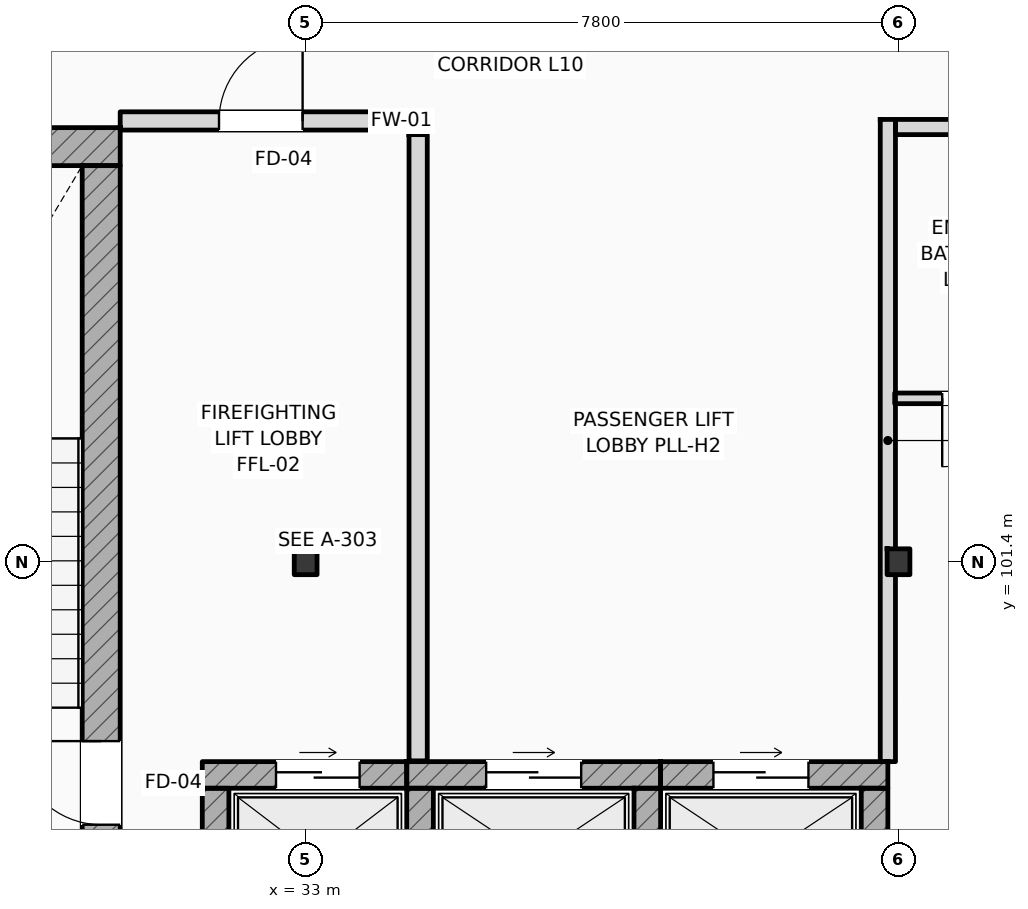
"""IFC4 building model, lengths in metres.
Left out: names, types, materials, properties, quantities, classifications, styles, units other than length and angle.
Written with IfcOpenShell. Run it as: python <this file> out.ifc"""

import sys

from ifc_helpers import new_model, si_unit, direction, frame, frame_2d, origin, origin_2d, place, context, subcontext, project, spatial, rectangle, i_section, extrude, element, fill, save


model = new_model("IFC4")
c1 = context("Model", 3, precision=1e-05, world=origin(), true_north=direction((0.0, 1.0)))
c2 = subcontext(c1, "Body", "Model", "MODEL_VIEW")
j1 = project(units=[si_unit("LENGTHUNIT", "METRE"), si_unit("PLANEANGLEUNIT", "RADIAN")], contexts=[c1])
p1 = place(None, origin())
s1 = spatial("IfcSite", under=j1, at=p1, CompositionType="ELEMENT")
p2 = place(p1, origin())
s2 = spatial("IfcBuilding", under=s1, at=p2, CompositionType="ELEMENT")
p3 = place(p2, frame((0.0, 0.0, 42.6)))
s3 = spatial("IfcBuildingStorey", under=s2, at=p3, CompositionType="ELEMENT", Elevation=42.6)
for number, where, z_axis, x_axis in (
    (1, (33.0, 101.4, 0.0), (0.0, 0.0, 1.0), (1.0, 0.0, 0.0)),
    (2, (40.8, 101.4, 0.0), (0.0, 0.0, 1.0), (1.0, 0.0, 0.0)),
):
    element("IfcColumn", number, at=place(p3, frame(where, z_axis=z_axis, x_axis=x_axis)), inside=s3, PredefinedType="COLUMN", context=c2, shape_type="SweptSolid", body=[
        extrude(i_section(OverallWidth=0.3, OverallDepth=0.34, WebThickness=0.012, FlangeThickness=0.021, FilletRadius=0.027, at=origin_2d()), origin(), (0.0, 0.0, 1.0), 4.2),
    ])
p4 = place(p3, frame((25.4, 106.862, 0.0), z_axis=(0.0, 0.0, 1.0), x_axis=(1.0, 0.0, 0.0)))
e3 = element("IfcWall", 3, at=p4, inside=s3, PredefinedType="SHEAR", context=c2, shape_type="SweptSolid", body=[
    extrude(rectangle(XDim=5.16, YDim=0.5, at=frame_2d((2.58, 0.0))), origin(), (0.0, 0.0, 1.0), 4.2),
])
p5 = place(p3, frame((30.31, 97.5, 0.0), z_axis=(0.0, 0.0, 1.0), x_axis=(0.0, 1.0, 0.0)))
e4 = element("IfcWall", 4, at=p5, inside=s3, PredefinedType="SHEAR", context=c2, shape_type="SweptSolid", body=[
    extrude(rectangle(XDim=9.112, YDim=0.5, at=frame_2d((4.556, 0.0))), origin(), (0.0, 0.0, 1.0), 4.2),
])
p6 = place(p5, frame((0.44, 0.0, 0.0)))
e5 = element("IfcOpeningElement", 5, at=p6, cuts=e4, PredefinedType="OPENING", context=c2, shape_type="SweptSolid", body=[
    extrude(rectangle(XDim=1.1, YDim=2.2, at=frame_2d((0.55, 1.1))), frame((0.0, 0.26, 0.0), z_axis=(0.0, -1.0, 0.0), x_axis=(1.0, 0.0, 0.0)), (0.0, 0.0, 1.0), 0.52),
])
p7 = place(p3, frame((31.64, 98.595, 0.0), z_axis=(0.0, 0.0, 1.0), x_axis=(1.0, 0.0, 0.0)))
e6 = element("IfcWall", 6, at=p7, inside=s3, PredefinedType="SHEAR", context=c2, shape_type="SweptSolid", body=[
    extrude(rectangle(XDim=2.69, YDim=0.35, at=frame_2d((1.345, 0.0))), origin(), (0.0, 0.0, 1.0), 3.94),
])
p8 = place(p7, frame((0.97, 0.0, 0.0)))
e7 = element("IfcOpeningElement", 7, at=p8, cuts=e6, PredefinedType="OPENING", context=c2, shape_type="SweptSolid", body=[
    extrude(rectangle(XDim=1.1, YDim=2.2, at=frame_2d((0.55, 1.1))), frame((0.0, 0.185, 0.0), z_axis=(0.0, -1.0, 0.0), x_axis=(1.0, 0.0, 0.0)), (0.0, 0.0, 1.0), 0.37),
])
p9 = place(p3, frame((31.815, 96.58, 0.0), z_axis=(0.0, 0.0, 1.0), x_axis=(0.0, 1.0, 0.0)))
e8 = element("IfcWall", 8, at=p9, inside=s3, PredefinedType="SHEAR", context=c2, shape_type="SweptSolid", body=[
    extrude(rectangle(XDim=1.84, YDim=0.35, at=frame_2d((0.92, 0.0))), origin(), (0.0, 0.0, 1.0), 3.94),
])
p10 = place(p3, frame((34.33, 98.595, 0.0), z_axis=(0.0, 0.0, 1.0), x_axis=(1.0, 0.0, 0.0)))
e9 = element("IfcWall", 9, at=p10, inside=s3, PredefinedType="SHEAR", context=c2, shape_type="SweptSolid", body=[
    extrude(rectangle(XDim=3.34, YDim=0.35, at=frame_2d((1.67, 0.0))), origin(), (0.0, 0.0, 1.0), 3.94),
])
p11 = place(p10, frame((1.045, 0.0, 0.0)))
e10 = element("IfcOpeningElement", 10, at=p11, cuts=e9, PredefinedType="OPENING", context=c2, shape_type="SweptSolid", body=[
    extrude(rectangle(XDim=1.25, YDim=2.25, at=frame_2d((0.625, 1.125))), frame((0.0, 0.185, 0.0), z_axis=(0.0, -1.0, 0.0), x_axis=(1.0, 0.0, 0.0)), (0.0, 0.0, 1.0), 0.37),
])
for number, where, z_axis, x_axis in (
    (11, (34.505, 96.58, 0.0), (0.0, 0.0, 1.0), (0.0, 1.0, 0.0)),
    (12, (37.495, 96.58, 0.0), (0.0, 0.0, 1.0), (0.0, 1.0, 0.0)),
):
    element("IfcWall", number, at=place(p3, frame(where, z_axis=z_axis, x_axis=x_axis)), inside=s3, PredefinedType="SHEAR", context=c2, shape_type="SweptSolid", body=[
        extrude(rectangle(XDim=1.84, YDim=0.35, at=frame_2d((0.92, 0.0))), origin(), (0.0, 0.0, 1.0), 3.94),
    ])
p12 = place(p3, frame((37.67, 98.595, 0.0), z_axis=(0.0, 0.0, 1.0), x_axis=(1.0, 0.0, 0.0)))
e13 = element("IfcWall", 13, at=p12, inside=s3, PredefinedType="SHEAR", context=c2, shape_type="SweptSolid", body=[
    extrude(rectangle(XDim=2.99, YDim=0.35, at=frame_2d((1.495, 0.0))), origin(), (0.0, 0.0, 1.0), 3.94),
])
p13 = place(p12, frame((0.695, 0.0, 0.0)))
e14 = element("IfcOpeningElement", 14, at=p13, cuts=e13, PredefinedType="OPENING", context=c2, shape_type="SweptSolid", body=[
    extrude(rectangle(XDim=1.25, YDim=2.25, at=frame_2d((0.625, 1.125))), frame((0.0, 0.185, 0.0), z_axis=(0.0, -1.0, 0.0), x_axis=(1.0, 0.0, 0.0)), (0.0, 0.0, 1.0), 0.37),
])
p14 = place(p3, frame((40.485, 96.58, 0.0), z_axis=(0.0, 0.0, 1.0), x_axis=(0.0, 1.0, 0.0)))
e15 = element("IfcWall", 15, at=p14, inside=s3, PredefinedType="SHEAR", context=c2, shape_type="SweptSolid", body=[
    extrude(rectangle(XDim=1.84, YDim=0.35, at=frame_2d((0.92, 0.0))), origin(), (0.0, 0.0, 1.0), 3.57),
])
p15 = place(p3, frame((34.48, 98.78, 0.0), z_axis=(0.0, 0.0, 1.0), x_axis=(0.0, 1.0, 0.0)))
e16 = element("IfcWall", 16, at=p15, inside=s3, PredefinedType="STANDARD", context=c2, shape_type="SweptSolid", body=[
    extrude(rectangle(XDim=8.24, YDim=0.24, at=frame_2d((4.12, 0.0))), origin(), (0.0, 0.0, 1.0), 3.94),
])
p16 = place(p3, frame((30.56, 107.2, 0.0), z_axis=(0.0, 0.0, 1.0), x_axis=(1.0, 0.0, 0.0)))
e17 = element("IfcWall", 17, at=p16, inside=s3, PredefinedType="STANDARD", context=c2, shape_type="SweptSolid", body=[
    extrude(rectangle(XDim=4.1, YDim=0.24, at=frame_2d((2.05, 0.0))), origin(), (0.0, 0.0, 1.0), 3.94),
])
p17 = place(p16, frame((1.3, 0.0, 0.0)))
e18 = element("IfcOpeningElement", 18, at=p17, cuts=e17, PredefinedType="OPENING", context=c2, shape_type="SweptSolid", body=[
    extrude(rectangle(XDim=1.1, YDim=2.2, at=frame_2d((0.55, 1.1))), frame((0.0, 0.13, 0.0), z_axis=(0.0, -1.0, 0.0), x_axis=(1.0, 0.0, 0.0)), (0.0, 0.0, 1.0), 0.26),
])
p18 = place(p3, frame((40.76, 107.12, 0.0), z_axis=(0.0, 0.0, 1.0), x_axis=(1.0, 0.0, 0.0)))
e19 = element("IfcWall", 19, at=p18, inside=s3, PredefinedType="PARTITIONING", context=c2, shape_type="SweptSolid", body=[
    extrude(rectangle(XDim=23.44, YDim=0.2, at=frame_2d((11.72, 0.0))), origin(), (0.0, 0.0, 1.0), 3.94),
])
p19 = place(p18, frame((2.99, 0.0, 0.0)))
e20 = element("IfcOpeningElement", 20, at=p19, cuts=e19, PredefinedType="OPENING", context=c2, shape_type="SweptSolid", body=[
    extrude(rectangle(XDim=0.96, YDim=2.2, at=frame_2d((0.48, 1.1))), frame((0.0, 0.11, 0.0), z_axis=(0.0, -1.0, 0.0), x_axis=(1.0, 0.0, 0.0)), (0.0, 0.0, 1.0), 0.22),
])
p20 = place(p18, frame((5.5, 0.0, 0.0)))
e21 = element("IfcOpeningElement", 21, at=p20, cuts=e19, PredefinedType="OPENING", context=c2, shape_type="SweptSolid", body=[
    extrude(rectangle(XDim=0.96, YDim=2.2, at=frame_2d((0.48, 1.1))), frame((0.0, 0.11, 0.0), z_axis=(0.0, -1.0, 0.0), x_axis=(1.0, 0.0, 0.0)), (0.0, 0.0, 1.0), 0.22),
])
p21 = place(p18, frame((12.34, 0.0, 0.0)))
e22 = element("IfcOpeningElement", 22, at=p21, cuts=e19, PredefinedType="OPENING", context=c2, shape_type="SweptSolid", body=[
    extrude(rectangle(XDim=0.96, YDim=2.2, at=frame_2d((0.48, 1.1))), frame((0.0, 0.11, 0.0), z_axis=(0.0, -1.0, 0.0), x_axis=(1.0, 0.0, 0.0)), (0.0, 0.0, 1.0), 0.22),
])
p22 = place(p18, frame((17.03, 0.0, 0.0)))
e23 = element("IfcOpeningElement", 23, at=p22, cuts=e19, PredefinedType="OPENING", context=c2, shape_type="SweptSolid", body=[
    extrude(rectangle(XDim=0.96, YDim=2.2, at=frame_2d((0.48, 1.1))), frame((0.0, 0.11, 0.0), z_axis=(0.0, -1.0, 0.0), x_axis=(1.0, 0.0, 0.0)), (0.0, 0.0, 1.0), 0.22),
])
p23 = place(p18, frame((19.51, 0.0, 0.0)))
e24 = element("IfcOpeningElement", 24, at=p23, cuts=e19, PredefinedType="OPENING", context=c2, shape_type="SweptSolid", body=[
    extrude(rectangle(XDim=0.96, YDim=2.2, at=frame_2d((0.48, 1.1))), frame((0.0, 0.11, 0.0), z_axis=(0.0, -1.0, 0.0), x_axis=(1.0, 0.0, 0.0)), (0.0, 0.0, 1.0), 0.22),
])
p24 = place(p3, frame((40.66, 98.77, 0.0), z_axis=(0.0, 0.0, 1.0), x_axis=(0.0, 1.0, 0.0)))
e25 = element("IfcWall", 25, at=p24, inside=s3, PredefinedType="PARTITIONING", context=c2, shape_type="SweptSolid", body=[
    extrude(rectangle(XDim=8.45, YDim=0.2, at=frame_2d((4.225, 0.0))), origin(), (0.0, 0.0, 1.0), 3.57),
])
p25 = place(p3, frame((40.75, 103.55, 0.0), z_axis=(0.0, 0.0, 1.0), x_axis=(1.0, 0.0, 0.0)))
e26 = element("IfcWall", 26, at=p25, inside=s3, PredefinedType="PARTITIONING", context=c2, shape_type="SweptSolid", body=[
    extrude(rectangle(XDim=2.15, YDim=0.14, at=frame_2d((1.075, 0.0))), origin(), (0.0, 0.0, 1.0), 3.94),
])
p26 = place(p25, frame((0.625, 0.0, 0.0)))
e27 = element("IfcOpeningElement", 27, at=p26, cuts=e26, PredefinedType="OPENING", context=c2, shape_type="SweptSolid", body=[
    extrude(rectangle(XDim=0.9, YDim=2.1, at=frame_2d((0.45, 1.05))), frame((0.0, 0.08, 0.0), z_axis=(0.0, -1.0, 0.0), x_axis=(1.0, 0.0, 0.0)), (0.0, 0.0, 1.0), 0.16),
])
p27 = place(p6, origin())
e28 = element("IfcDoor", 28, at=p27, inside=s3, OperationType="SINGLE_SWING_RIGHT", PredefinedType="DOOR", context=c2, shape_type="SweptSolid", body=[
    extrude(rectangle(XDim=1.1, YDim=2.2, at=frame_2d((0.55, 1.1))), frame((0.0, 0.025, 0.0), z_axis=(0.0, -1.0, 0.0), x_axis=(1.0, 0.0, 0.0)), (0.0, 0.0, 1.0), 0.05),
])
fill(e5, e28)
p28 = place(p8, origin())
e29 = element("IfcDoor", 29, at=p28, inside=s3, OperationType="SLIDING_TO_LEFT", PredefinedType="DOOR", context=c2, shape_type="SweptSolid", body=[
    extrude(rectangle(XDim=1.1, YDim=2.2, at=frame_2d((0.55, 1.1))), frame((0.0, 0.025, 0.0), z_axis=(0.0, -1.0, 0.0), x_axis=(1.0, 0.0, 0.0)), (0.0, 0.0, 1.0), 0.05),
])
fill(e7, e29)
p29 = place(p11, origin())
e30 = element("IfcDoor", 30, at=p29, inside=s3, OperationType="SLIDING_TO_LEFT", PredefinedType="DOOR", context=c2, shape_type="SweptSolid", body=[
    extrude(rectangle(XDim=1.25, YDim=2.25, at=frame_2d((0.625, 1.125))), frame((0.0, 0.025, 0.0), z_axis=(0.0, -1.0, 0.0), x_axis=(1.0, 0.0, 0.0)), (0.0, 0.0, 1.0), 0.05),
])
fill(e10, e30)
p30 = place(p13, origin())
e31 = element("IfcDoor", 31, at=p30, inside=s3, OperationType="SLIDING_TO_LEFT", PredefinedType="DOOR", context=c2, shape_type="SweptSolid", body=[
    extrude(rectangle(XDim=1.25, YDim=2.25, at=frame_2d((0.625, 1.125))), frame((0.0, 0.025, 0.0), z_axis=(0.0, -1.0, 0.0), x_axis=(1.0, 0.0, 0.0)), (0.0, 0.0, 1.0), 0.05),
])
fill(e14, e31)
p31 = place(p17, origin())
e32 = element("IfcDoor", 32, at=p31, inside=s3, OperationType="SINGLE_SWING_RIGHT", PredefinedType="DOOR", context=c2, shape_type="SweptSolid", body=[
    extrude(rectangle(XDim=1.1, YDim=2.2, at=frame_2d((0.55, 1.1))), frame((0.0, 0.025, 0.0), z_axis=(0.0, -1.0, 0.0), x_axis=(1.0, 0.0, 0.0)), (0.0, 0.0, 1.0), 0.05),
])
fill(e18, e32)
p32 = place(p26, frame((0.9, 0.0, 0.0), z_axis=(0.0, 0.0, 1.0), x_axis=(-1.0, 0.0, 0.0)))
e33 = element("IfcDoor", 33, at=p32, inside=s3, OperationType="SINGLE_SWING_LEFT", PredefinedType="DOOR", context=c2, shape_type="SweptSolid", body=[
    extrude(rectangle(XDim=0.9, YDim=2.1, at=frame_2d((0.45, 1.05))), frame((0.0, 0.025, 0.0), z_axis=(0.0, -1.0, 0.0), x_axis=(1.0, 0.0, 0.0)), (0.0, 0.0, 1.0), 0.05),
])
fill(e27, e33)
save(model, sys.argv[1])
